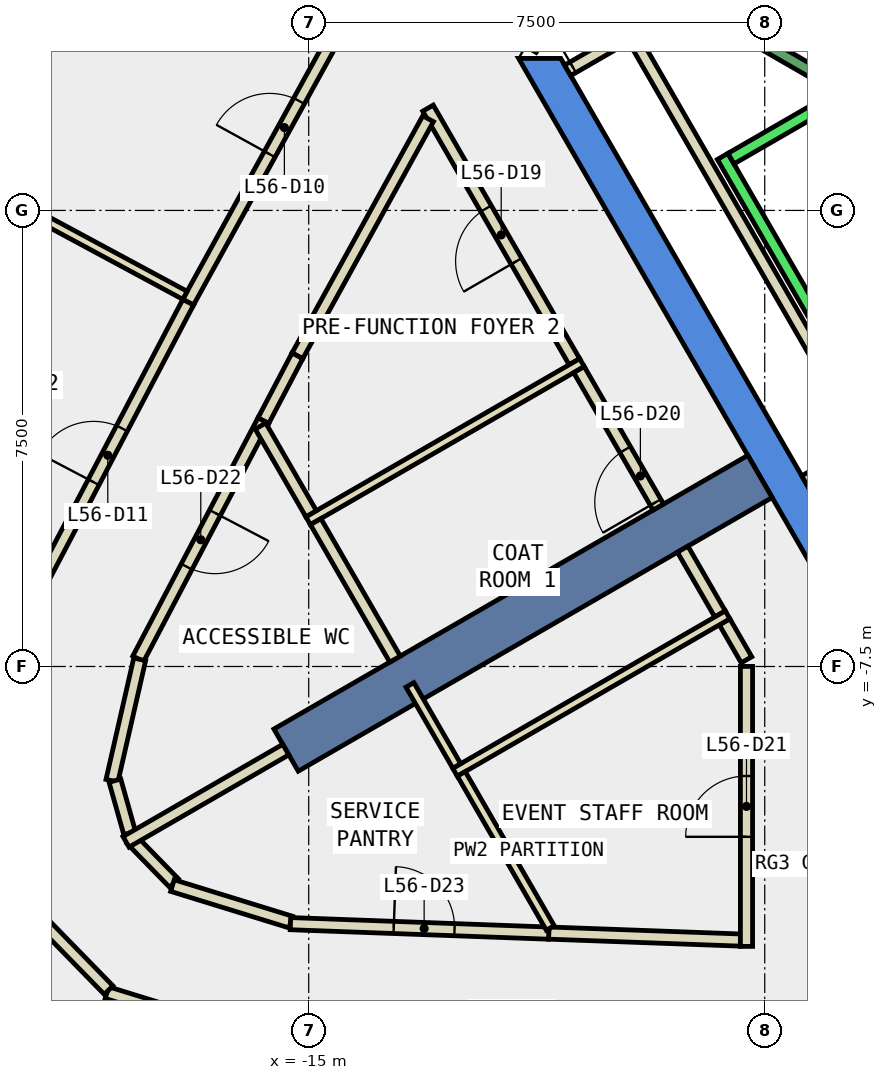
"""IFC4 building model, lengths in metres.
Left out: names, types, materials, properties, quantities, classifications, styles, units other than length and angle.
Written with IfcOpenShell. Run it as: python <this file> out.ifc"""

import sys

from ifc_helpers import new_model, si_unit, direction, frame, frame_2d, origin, place, context, subcontext, project, spatial, polyline, rectangle, outline, extrude, element, fill, save


model = new_model("IFC4")
c1 = context("Model", 3, precision=1e-05, world=origin(), true_north=direction((0.0, 1.0)))
c2 = subcontext(c1, "Body", "Model", "MODEL_VIEW")
j1 = project(units=[si_unit("LENGTHUNIT", "METRE"), si_unit("PLANEANGLEUNIT", "RADIAN")], contexts=[c1])
p1 = place(None, origin())
s1 = spatial("IfcSite", under=j1, at=p1, CompositionType="ELEMENT")
p2 = place(p1, origin())
s2 = spatial("IfcBuilding", under=s1, at=p2, CompositionType="ELEMENT")
p3 = place(p2, frame((0.0, 0.0, 248.6)))
s3 = spatial("IfcBuildingStorey", under=s2, at=p3, CompositionType="ELEMENT", Elevation=248.6)
p4 = place(p3, frame((0.0, 0.0, -0.34)))
e1 = element("IfcWall", 1, at=p4, inside=s3, PredefinedType="SHEAR", context=c2, shape_type="SweptSolid", body=[
    extrude(outline(polyline([(-11.547, 2.5), (-5.774, -7.5), (-5.427, -6.9), (-10.854, 2.5), (-11.547, 2.5)])), origin(), (0.0, 0.0, 1.0), 3.6),
])
p5 = place(p3, frame((-7.578, -4.375, -0.34), z_axis=(0.0, 0.0, 1.0), x_axis=(-0.866024315419, -0.5000018851, 0.0)))
e2 = element("IfcWall", 2, at=p5, inside=s3, PredefinedType="SHEAR", context=c2, shape_type="SweptSolid", body=[
    extrude(rectangle(XDim=9.0, YDim=0.8, at=frame_2d((4.5, 0.0))), origin(), (0.0, 0.0, 1.0), 3.6),
])
p6 = place(p3, frame((-18.805, 6.475, 0.0), z_axis=(0.0, 0.0, 1.0), x_axis=(-0.482734585173, -0.875766704253, 0.0)))
e3 = element("IfcWall", 3, at=p6, inside=s3, PredefinedType="STANDARD", context=c2, shape_type="SweptSolid", body=[
    extrude(rectangle(XDim=5.593, YDim=0.3, at=frame_2d((2.796, 0.0))), origin(), (0.0, 0.0, 1.0), 3.26),
])
p7 = place(p6, frame((0.698, 0.0, 0.9)))
e4 = element("IfcOpeningElement", 4, at=p7, cuts=e3, PredefinedType="OPENING", context=c2, shape_type="SweptSolid", body=[
    extrude(rectangle(XDim=1.4, YDim=2.0, at=frame_2d((0.7, 1.0))), frame((0.0, 0.16, 0.0), z_axis=(0.0, -1.0, 0.0), x_axis=(1.0, 0.0, 0.0)), (0.0, 0.0, 1.0), 0.32),
])
p8 = place(p6, frame((3.495, 0.0, 0.9)))
e5 = element("IfcOpeningElement", 5, at=p8, cuts=e3, PredefinedType="OPENING", context=c2, shape_type="SweptSolid", body=[
    extrude(rectangle(XDim=1.4, YDim=2.0, at=frame_2d((0.7, 1.0))), frame((0.0, 0.16, 0.0), z_axis=(0.0, -1.0, 0.0), x_axis=(1.0, 0.0, 0.0)), (0.0, 0.0, 1.0), 0.32),
])
p9 = place(p3, frame((-10.63, -2.488, 0.0), z_axis=(0.0, 0.0, 1.0), x_axis=(-0.500108649621, 0.865962665808, 0.0)))
e6 = element("IfcWall", 6, at=p9, inside=s3, PredefinedType="PARTITIONING", context=c2, shape_type="SweptSolid", body=[
    extrude(rectangle(XDim=4.815, YDim=0.2, at=frame_2d((2.408, 0.0))), origin(), (0.0, 0.0, 1.0), 3.26),
])
p10 = place(p9, frame((1.908, 0.0, 0.0)))
e7 = element("IfcOpeningElement", 7, at=p10, cuts=e6, PredefinedType="OPENING", context=c2, shape_type="SweptSolid", body=[
    extrude(rectangle(XDim=1.0, YDim=2.1, at=frame_2d((0.5, 1.05))), frame((0.0, 0.11, 0.0), z_axis=(0.0, -1.0, 0.0), x_axis=(1.0, 0.0, 0.0)), (0.0, 0.0, 1.0), 0.22),
])
p11 = place(p3, frame((-13.036, 1.508, 0.0), z_axis=(0.0, 0.0, 1.0), x_axis=(-0.482884552822, -0.87568402329, 0.0)))
e8 = element("IfcWall", 8, at=p11, inside=s3, PredefinedType="PARTITIONING", context=c2, shape_type="SweptSolid", body=[
    extrude(rectangle(XDim=4.453, YDim=0.2, at=frame_2d((2.226, 0.0))), origin(), (0.0, 0.0, 1.0), 3.26),
])
p12 = place(p3, frame((-15.186, -2.391, 0.0), z_axis=(0.0, 0.0, 1.0), x_axis=(-0.464794189951, -0.885418748948, 0.0)))
e9 = element("IfcWall", 9, at=p12, inside=s3, PredefinedType="PARTITIONING", context=c2, shape_type="SweptSolid", body=[
    extrude(rectangle(XDim=1.205, YDim=0.2, at=frame_2d((0.603, 0.0))), origin(), (0.0, 0.0, 1.0), 3.26),
])
p13 = place(p3, frame((-8.235, -6.636, 0.0), z_axis=(0.0, 0.0, 1.0), x_axis=(-0.500089055364, 0.86597398154, 0.0)))
e10 = element("IfcWall", 10, at=p13, inside=s3, PredefinedType="PARTITIONING", context=c2, shape_type="SweptSolid", body=[
    extrude(rectangle(XDim=1.23, YDim=0.2, at=frame_2d((0.615, 0.0))), origin(), (0.0, 0.0, 1.0), 3.26),
])
p14 = place(p3, frame((-7.8, -7.39, 0.0), z_axis=(0.0, 0.0, 1.0), x_axis=(-0.499712670472, 0.866191230024, 0.0)))
e11 = element("IfcWall", 11, at=p14, inside=s3, PredefinedType="PARTITIONING", context=c2, shape_type="SweptSolid", body=[
    extrude(rectangle(XDim=0.72, YDim=0.2, at=frame_2d((0.36, 0.0))), origin(), (0.0, 0.0, 1.0), 3.26),
])
p15 = place(p3, frame((-11.052, -11.884, 0.0), z_axis=(0.0, 0.0, 1.0), x_axis=(0.999335249241, -0.036456270033, 0.0)))
e12 = element("IfcWall", 12, at=p15, inside=s3, PredefinedType="PARTITIONING", context=c2, shape_type="SweptSolid", body=[
    extrude(rectangle(XDim=3.154, YDim=0.2, at=frame_2d((1.577, 0.0))), origin(), (0.0, 0.0, 1.0), 3.26),
])
p16 = place(p3, frame((-15.746, -3.458, 0.0), z_axis=(0.0, 0.0, 1.0), x_axis=(-0.465179971699, -0.885216128372, 0.0)))
e13 = element("IfcWall", 13, at=p16, inside=s3, PredefinedType="PARTITIONING", context=c2, shape_type="SweptSolid", body=[
    extrude(rectangle(XDim=4.424, YDim=0.2, at=frame_2d((2.212, 0.0))), origin(), (0.0, 0.0, 1.0), 3.26),
])
p17 = place(p16, frame((1.712, 0.0, 0.0)))
e14 = element("IfcOpeningElement", 14, at=p17, cuts=e13, PredefinedType="OPENING", context=c2, shape_type="SweptSolid", body=[
    extrude(rectangle(XDim=1.0, YDim=2.1, at=frame_2d((0.5, 1.05))), frame((0.0, 0.11, 0.0), z_axis=(0.0, -1.0, 0.0), x_axis=(1.0, 0.0, 0.0)), (0.0, 0.0, 1.0), 0.22),
])
p18 = place(p3, frame((-17.78, -7.383, 0.0), z_axis=(0.0, 0.0, 1.0), x_axis=(-0.222760041204, -0.974873306662, 0.0)))
e15 = element("IfcWall", 15, at=p18, inside=s3, PredefinedType="PARTITIONING", context=c2, shape_type="SweptSolid", body=[
    extrude(rectangle(XDim=2.047, YDim=0.2, at=frame_2d((1.024, 0.0))), origin(), (0.0, 0.0, 1.0), 3.26),
])
p19 = place(p3, frame((-18.187, -9.378, 0.0), z_axis=(0.0, 0.0, 1.0), x_axis=(0.270785141481, -0.962639811743, 0.0)))
e16 = element("IfcWall", 16, at=p19, inside=s3, PredefinedType="PARTITIONING", context=c2, shape_type="SweptSolid", body=[
    extrude(rectangle(XDim=0.894, YDim=0.2, at=frame_2d((0.447, 0.0))), origin(), (0.0, 0.0, 1.0), 3.26),
])
p20 = place(p3, frame((-17.915, -10.344, 0.0), z_axis=(0.0, 0.0, 1.0), x_axis=(0.698527813511, -0.715582904877, 0.0)))
e17 = element("IfcWall", 17, at=p20, inside=s3, PredefinedType="PARTITIONING", context=c2, shape_type="SweptSolid", body=[
    extrude(rectangle(XDim=1.002, YDim=0.2, at=frame_2d((0.501, 0.0))), origin(), (0.0, 0.0, 1.0), 3.26),
])
p21 = place(p3, frame((-17.241, -11.103, 0.0), z_axis=(0.0, 0.0, 1.0), x_axis=(0.95563113363, -0.294566013716, 0.0)))
e18 = element("IfcWall", 18, at=p21, inside=s3, PredefinedType="PARTITIONING", context=c2, shape_type="SweptSolid", body=[
    extrude(rectangle(XDim=2.036, YDim=0.2, at=frame_2d((1.018, 0.0))), origin(), (0.0, 0.0, 1.0), 3.26),
])
p22 = place(p3, frame((-15.3, -11.729, 0.0), z_axis=(0.0, 0.0, 1.0), x_axis=(0.999326350165, -0.036699398722, 0.0)))
e19 = element("IfcWall", 19, at=p22, inside=s3, PredefinedType="PARTITIONING", context=c2, shape_type="SweptSolid", body=[
    extrude(rectangle(XDim=4.251, YDim=0.2, at=frame_2d((2.125, 0.0))), origin(), (0.0, 0.0, 1.0), 3.26),
])
p23 = place(p22, frame((1.7, 0.0, 0.0)))
e20 = element("IfcOpeningElement", 20, at=p23, cuts=e19, PredefinedType="OPENING", context=c2, shape_type="SweptSolid", body=[
    extrude(rectangle(XDim=1.0, YDim=2.1, at=frame_2d((0.5, 1.05))), frame((0.0, 0.11, 0.0), z_axis=(0.0, -1.0, 0.0), x_axis=(1.0, 0.0, 0.0)), (0.0, 0.0, 1.0), 0.22),
])
p24 = place(p3, frame((-16.983, -1.509, 0.0), z_axis=(0.0, 0.0, 1.0), x_axis=(0.482785999899, 0.875738361785, 0.0)))
e21 = element("IfcWall", 21, at=p24, inside=s3, PredefinedType="PARTITIONING", context=c2, shape_type="SweptSolid", body=[
    extrude(rectangle(XDim=6.558, YDim=0.2, at=frame_2d((3.279, 0.0))), origin(), (0.0, 0.0, 1.0), 3.26),
])
p25 = place(p24, frame((2.779, 0.0, 0.0)))
e22 = element("IfcOpeningElement", 22, at=p25, cuts=e21, PredefinedType="OPENING", context=c2, shape_type="SweptSolid", body=[
    extrude(rectangle(XDim=1.0, YDim=2.1, at=frame_2d((0.5, 1.05))), frame((0.0, 0.11, 0.0), z_axis=(0.0, -1.0, 0.0), x_axis=(1.0, 0.0, 0.0)), (0.0, 0.0, 1.0), 0.22),
])
p26 = place(p3, frame((-19.696, -6.675, 0.0), z_axis=(0.0, 0.0, 1.0), x_axis=(0.465165163774, 0.88522390976, 0.0)))
e23 = element("IfcWall", 23, at=p26, inside=s3, PredefinedType="PARTITIONING", context=c2, shape_type="SweptSolid", body=[
    extrude(rectangle(XDim=5.835, YDim=0.2, at=frame_2d((2.917, 0.0))), origin(), (0.0, 0.0, 1.0), 3.26),
])
p27 = place(p26, frame((2.492, 0.0, 0.0)))
e24 = element("IfcOpeningElement", 24, at=p27, cuts=e23, PredefinedType="OPENING", context=c2, shape_type="SweptSolid", body=[
    extrude(rectangle(XDim=1.0, YDim=2.1, at=frame_2d((0.5, 1.05))), frame((0.0, 0.11, 0.0), z_axis=(0.0, -1.0, 0.0), x_axis=(1.0, 0.0, 0.0)), (0.0, 0.0, 1.0), 0.22),
])
p28 = place(p3, frame((-15.632, -13.692, 0.0), z_axis=(0.0, 0.0, 1.0), x_axis=(-0.955600342663, 0.294665887239, 0.0)))
e25 = element("IfcWall", 25, at=p28, inside=s3, PredefinedType="PARTITIONING", context=c2, shape_type="SweptSolid", body=[
    extrude(rectangle(XDim=2.81, YDim=0.2, at=frame_2d((1.405, 0.0))), origin(), (0.0, 0.0, 1.0), 3.26),
])
p29 = place(p3, frame((-18.291, -12.822, 0.0), z_axis=(0.0, 0.0, 1.0), x_axis=(-0.698477855606, 0.715631668687, 0.0)))
e26 = element("IfcWall", 26, at=p29, inside=s3, PredefinedType="PARTITIONING", context=c2, shape_type="SweptSolid", body=[
    extrude(rectangle(XDim=1.921, YDim=0.2, at=frame_2d((0.961, 0.0))), origin(), (0.0, 0.0, 1.0), 3.26),
])
p30 = place(p3, frame((-5.888, -3.902, 0.0), z_axis=(0.0, 0.0, 1.0), x_axis=(-0.86621513555, -0.499671230855, 0.0)))
e27 = element("IfcWall", 27, at=p30, inside=s3, PredefinedType="PARTITIONING", context=c2, shape_type="SweptSolid", body=[
    extrude(rectangle(XDim=1.1, YDim=0.2, at=frame_2d((0.55, 0.0))), origin(), (0.0, 0.0, 1.0), 3.26),
])
p31 = place(p3, frame((-10.741, 2.303, 0.0), z_axis=(0.0, 0.0, 1.0), x_axis=(0.866063652425, 0.499933745558, 0.0)))
e28 = element("IfcWall", 28, at=p31, inside=s3, PredefinedType="PARTITIONING", context=c2, shape_type="SweptSolid", body=[
    extrude(rectangle(XDim=1.1, YDim=0.2, at=frame_2d((0.55, 0.0))), origin(), (0.0, 0.0, 1.0), 3.26),
])
p32 = place(p31, frame((0.1, 0.0, 0.0)))
e29 = element("IfcOpeningElement", 29, at=p32, cuts=e28, PredefinedType="OPENING", context=c2, shape_type="SweptSolid", body=[
    extrude(rectangle(XDim=0.9, YDim=2.1, at=frame_2d((0.45, 1.05))), frame((0.0, 0.11, 0.0), z_axis=(0.0, -1.0, 0.0), x_axis=(1.0, 0.0, 0.0)), (0.0, 0.0, 1.0), 0.22),
])
p33 = place(p3, frame((-9.751, 2.99, 0.0), z_axis=(0.0, 0.0, 1.0), x_axis=(0.500012163284, -0.866018381195, 0.0)))
e30 = element("IfcWall", 30, at=p33, inside=s3, PredefinedType="PARTITIONING", context=c2, shape_type="SweptSolid", body=[
    extrude(rectangle(XDim=8.0, YDim=0.2, at=frame_2d((4.0, 0.0))), origin(), (0.0, 0.0, 1.0), 3.26),
])
p34 = place(p3, frame((-7.8, -12.103, 0.0), z_axis=(0.0, 0.0, 1.0), x_axis=(0.0, 1.0, 0.0)))
e31 = element("IfcWall", 31, at=p34, inside=s3, PredefinedType="PARTITIONING", context=c2, shape_type="SweptSolid", body=[
    extrude(rectangle(XDim=4.604, YDim=0.2, at=frame_2d((2.302, 0.0))), origin(), (0.0, 0.0, 1.0), 3.26),
])
p35 = place(p34, frame((1.802, 0.0, 0.0)))
e32 = element("IfcOpeningElement", 32, at=p35, cuts=e31, PredefinedType="OPENING", context=c2, shape_type="SweptSolid", body=[
    extrude(rectangle(XDim=1.0, YDim=2.1, at=frame_2d((0.5, 1.05))), frame((0.0, 0.11, 0.0), z_axis=(0.0, -1.0, 0.0), x_axis=(1.0, 0.0, 0.0)), (0.0, 0.0, 1.0), 0.22),
])
p36 = place(p3, frame((-10.506, -2.503, 0.0), z_axis=(0.0, 0.0, 1.0), x_axis=(-0.866044872465, -0.49996627774, 0.0)))
e33 = element("IfcWall", 33, at=p36, inside=s3, PredefinedType="PARTITIONING", context=c2, shape_type="SweptSolid", body=[
    extrude(rectangle(XDim=5.2, YDim=0.15, at=frame_2d((2.6, 0.0))), origin(), (0.0, 0.0, 1.0), 3.26),
])
p37 = place(p3, frame((-14.96, -4.988, 0.0), z_axis=(0.0, 0.0, 1.0), x_axis=(-0.500175017317, 0.865924333907, 0.0)))
e34 = element("IfcWall", 34, at=p37, inside=s3, PredefinedType="PARTITIONING", context=c2, shape_type="SweptSolid", body=[
    extrude(rectangle(XDim=1.666, YDim=0.2, at=frame_2d((0.833, 0.0))), origin(), (0.0, 0.0, 1.0), 3.26),
])
p38 = place(p3, frame((-8.111, -6.651, 0.0), z_axis=(0.0, 0.0, 1.0), x_axis=(-0.865984471925, -0.50007088936, 0.0)))
e35 = element("IfcWall", 35, at=p38, inside=s3, PredefinedType="PARTITIONING", context=c2, shape_type="SweptSolid", body=[
    extrude(rectangle(XDim=5.176, YDim=0.15, at=frame_2d((2.588, 0.0))), origin(), (0.0, 0.0, 1.0), 3.26),
])
p39 = place(p3, frame((-13.58, -7.379, 0.0), z_axis=(0.0, 0.0, 1.0), x_axis=(-0.499870876044, 0.866099940701, 0.0)))
e36 = element("IfcWall", 36, at=p39, inside=s3, PredefinedType="PARTITIONING", context=c2, shape_type="SweptSolid", body=[
    extrude(rectangle(XDim=2.611, YDim=0.2, at=frame_2d((1.305, 0.0))), origin(), (0.0, 0.0, 1.0), 3.26),
])
p40 = place(p3, frame((-12.565, -9.136, 0.0), z_axis=(0.0, 0.0, 1.0), x_axis=(-0.500198329269, 0.865910868044, 0.0)))
e37 = element("IfcWall", 37, at=p40, inside=s3, PredefinedType="PARTITIONING", context=c2, shape_type="SweptSolid", body=[
    extrude(rectangle(XDim=1.539, YDim=0.15, at=frame_2d((0.77, 0.0))), origin(), (0.0, 0.0, 1.0), 3.26),
])
p41 = place(p3, frame((-11.027, -11.8, 0.0), z_axis=(0.0, 0.0, 1.0), x_axis=(-0.499980071345, 0.866036909293, 0.0)))
e38 = element("IfcWall", 38, at=p41, inside=s3, PredefinedType="PARTITIONING", context=c2, shape_type="SweptSolid", body=[
    extrude(rectangle(XDim=2.926, YDim=0.15, at=frame_2d((1.463, 0.0))), origin(), (0.0, 0.0, 1.0), 3.26),
])
p42 = place(p3, frame((-15.377, -8.867, 0.0), z_axis=(0.0, 0.0, 1.0), x_axis=(-0.865965767548, -0.500103278768, 0.0)))
e39 = element("IfcWall", 39, at=p42, inside=s3, PredefinedType="PARTITIONING", context=c2, shape_type="SweptSolid", body=[
    extrude(rectangle(XDim=3.033, YDim=0.2, at=frame_2d((1.517, 0.0))), origin(), (0.0, 0.0, 1.0), 3.26),
])
p43 = place(p3, frame((-17.035, -1.396, 0.0), z_axis=(0.0, 0.0, 1.0), x_axis=(-0.88055795398, 0.473938487234, 0.0)))
e40 = element("IfcWall", 40, at=p43, inside=s3, PredefinedType="PARTITIONING", context=c2, shape_type="SweptSolid", body=[
    extrude(rectangle(XDim=3.88, YDim=0.15, at=frame_2d((1.94, 0.0))), origin(), (0.0, 0.0, 1.0), 3.26),
])
p44 = place(p3, frame((-9.25, -4.878, 0.0), z_axis=(0.0, 0.0, 1.0), x_axis=(-0.500032875382, 0.866006422342, 0.0)))
e41 = element("IfcWall", 41, at=p44, inside=s3, PredefinedType="PARTITIONING", context=c2, shape_type="SweptSolid", body=[
    extrude(rectangle(XDim=2.61, YDim=0.2, at=frame_2d((1.305, 0.0))), origin(), (0.0, 0.0, 1.0), 3.26),
])
p45 = place(p44, frame((0.09, 0.0, 0.0)))
e42 = element("IfcOpeningElement", 42, at=p45, cuts=e41, PredefinedType="OPENING", context=c2, shape_type="SweptSolid", body=[
    extrude(rectangle(XDim=1.0, YDim=2.1, at=frame_2d((0.5, 1.05))), frame((0.0, 0.11, 0.0), z_axis=(0.0, -1.0, 0.0), x_axis=(1.0, 0.0, 0.0)), (0.0, 0.0, 1.0), 0.22),
])
p46 = place(p3, frame((-8.192, 0.888, 0.0), z_axis=(0.0, 0.0, 1.0), x_axis=(0.500034260056, -0.866005622828, 0.0)))
e43 = element("IfcWall", 43, at=p46, inside=s3, PredefinedType="STANDARD", context=c2, shape_type="SweptSolid", body=[
    extrude(rectangle(XDim=5.399, YDim=0.2, at=frame_2d((2.7, 0.0))), origin(), (0.0, 0.0, 1.0), 3.26),
])
for number, where, z_axis, x_axis in (
    (44, (-5.977, 2.052, 0.0), (0.0, 0.0, 1.0), (-0.866, -0.5, 0.0)),
    (45, (-4.677, -0.2, 0.0), (0.0, 0.0, 1.0), (-0.866, -0.5, 0.0)),
):
    element("IfcWall", number, at=place(p3, frame(where, z_axis=z_axis, x_axis=x_axis)), inside=s3, PredefinedType="STANDARD", context=c2, shape_type="SweptSolid", body=[
        extrude(rectangle(XDim=2.399, YDim=0.2, at=frame_2d((1.2, 0.0))), origin(), (0.0, 0.0, 1.0), 3.26),
    ])
p47 = place(p3, frame((-6.25, 2.01, 0.0), z_axis=(0.0, 0.0, 1.0), x_axis=(-0.86611865017, 0.499838457731, 0.0)))
e46 = element("IfcWall", 46, at=p47, inside=s3, PredefinedType="STANDARD", context=c2, shape_type="SweptSolid", body=[
    extrude(rectangle(XDim=2.733, YDim=0.2, at=frame_2d((1.366, 0.0))), origin(), (0.0, 0.0, 1.0), 3.26),
])
p48 = place(p25, origin())
e47 = element("IfcDoor", 47, at=p48, inside=s3, OperationType="SINGLE_SWING_LEFT", PredefinedType="DOOR", context=c2, shape_type="SweptSolid", body=[
    extrude(rectangle(XDim=1.0, YDim=2.1, at=frame_2d((0.5, 1.05))), frame((0.0, 0.025, 0.0), z_axis=(0.0, -1.0, 0.0), x_axis=(1.0, 0.0, 0.0)), (0.0, 0.0, 1.0), 0.05),
])
fill(e22, e47)
p49 = place(p27, origin())
e48 = element("IfcDoor", 48, at=p49, inside=s3, OperationType="SINGLE_SWING_LEFT", PredefinedType="DOOR", context=c2, shape_type="SweptSolid", body=[
    extrude(rectangle(XDim=1.0, YDim=2.1, at=frame_2d((0.5, 1.05))), frame((0.0, 0.025, 0.0), z_axis=(0.0, -1.0, 0.0), x_axis=(1.0, 0.0, 0.0)), (0.0, 0.0, 1.0), 0.05),
])
fill(e24, e48)
p50 = place(p10, origin())
e49 = element("IfcDoor", 49, at=p50, inside=s3, OperationType="SINGLE_SWING_LEFT", PredefinedType="DOOR", context=c2, shape_type="SweptSolid", body=[
    extrude(rectangle(XDim=1.0, YDim=2.1, at=frame_2d((0.5, 1.05))), frame((0.0, 0.025, 0.0), z_axis=(0.0, -1.0, 0.0), x_axis=(1.0, 0.0, 0.0)), (0.0, 0.0, 1.0), 0.05),
])
fill(e7, e49)
p51 = place(p45, origin())
e50 = element("IfcDoor", 50, at=p51, inside=s3, OperationType="SINGLE_SWING_LEFT", PredefinedType="DOOR", context=c2, shape_type="SweptSolid", body=[
    extrude(rectangle(XDim=1.0, YDim=2.1, at=frame_2d((0.5, 1.05))), frame((0.0, 0.025, 0.0), z_axis=(0.0, -1.0, 0.0), x_axis=(1.0, 0.0, 0.0)), (0.0, 0.0, 1.0), 0.05),
])
fill(e42, e50)
p52 = place(p35, origin())
e51 = element("IfcDoor", 51, at=p52, inside=s3, OperationType="SINGLE_SWING_LEFT", PredefinedType="DOOR", context=c2, shape_type="SweptSolid", body=[
    extrude(rectangle(XDim=1.0, YDim=2.1, at=frame_2d((0.5, 1.05))), frame((0.0, 0.025, 0.0), z_axis=(0.0, -1.0, 0.0), x_axis=(1.0, 0.0, 0.0)), (0.0, 0.0, 1.0), 0.05),
])
fill(e32, e51)
p53 = place(p17, origin())
e52 = element("IfcDoor", 52, at=p53, inside=s3, OperationType="SINGLE_SWING_LEFT", PredefinedType="DOOR", context=c2, shape_type="SweptSolid", body=[
    extrude(rectangle(XDim=1.0, YDim=2.1, at=frame_2d((0.5, 1.05))), frame((0.0, 0.025, 0.0), z_axis=(0.0, -1.0, 0.0), x_axis=(1.0, 0.0, 0.0)), (0.0, 0.0, 1.0), 0.05),
])
fill(e14, e52)
p54 = place(p23, origin())
e53 = element("IfcDoor", 53, at=p54, inside=s3, OperationType="SINGLE_SWING_LEFT", PredefinedType="DOOR", context=c2, shape_type="SweptSolid", body=[
    extrude(rectangle(XDim=1.0, YDim=2.1, at=frame_2d((0.5, 1.05))), frame((0.0, 0.025, 0.0), z_axis=(0.0, -1.0, 0.0), x_axis=(1.0, 0.0, 0.0)), (0.0, 0.0, 1.0), 0.05),
])
fill(e20, e53)
p55 = place(p32, origin())
e54 = element("IfcDoor", 54, at=p55, inside=s3, OperationType="SINGLE_SWING_RIGHT", PredefinedType="DOOR", context=c2, shape_type="SweptSolid", body=[
    extrude(rectangle(XDim=0.9, YDim=2.1, at=frame_2d((0.45, 1.05))), frame((0.0, 0.025, 0.0), z_axis=(0.0, -1.0, 0.0), x_axis=(1.0, 0.0, 0.0)), (0.0, 0.0, 1.0), 0.05),
])
fill(e29, e54)
save(model, sys.argv[1])
